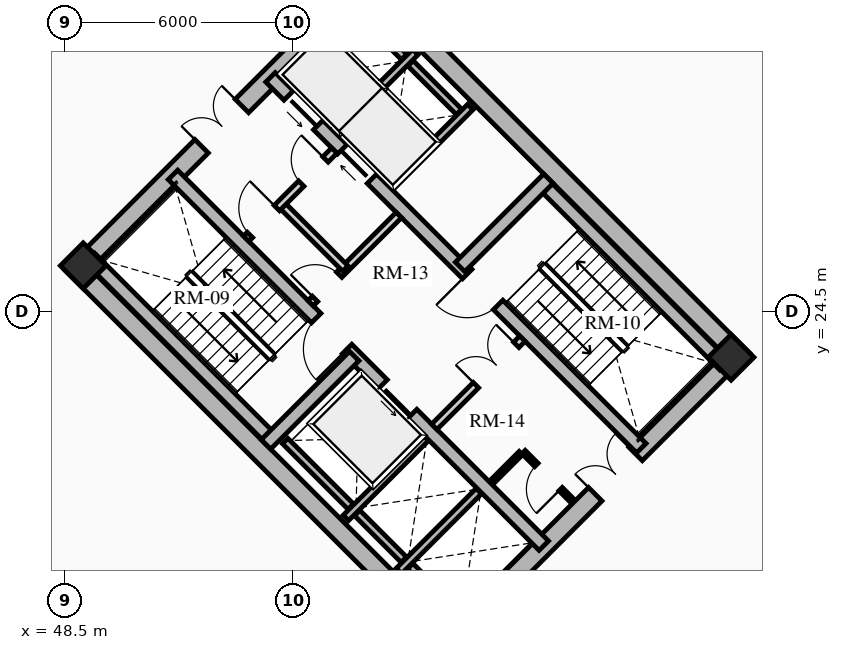
"""IFC4 building model, lengths in metres.
Left out: names, types, materials, properties, quantities, classifications, styles, units other than length and angle.
Written with IfcOpenShell. Run it as: python <this file> out.ifc"""

import sys

from ifc_helpers import new_model, si_unit, direction, frame, frame_2d, origin, origin_2d, place, context, subcontext, project, spatial, rectangle, extrude, source, transform, mapped, element, fill, save


model = new_model("IFC4")
c1 = context("Model", 3, precision=1e-05, world=origin(), true_north=direction((0.0, 1.0)))
c2 = subcontext(c1, "Body", "Model", "MODEL_VIEW")
j1 = project(units=[si_unit("LENGTHUNIT", "METRE"), si_unit("PLANEANGLEUNIT", "RADIAN")], contexts=[c1])
p1 = place(None, origin())
s1 = spatial("IfcSite", under=j1, at=p1, CompositionType="ELEMENT")
p2 = place(p1, origin())
s2 = spatial("IfcBuilding", under=s1, at=p2, CompositionType="ELEMENT")
p3 = place(p2, frame((0.0, 0.0, 13.2)))
s3 = spatial("IfcBuildingStorey", under=s2, at=p3, CompositionType="ELEMENT", Elevation=13.2)
for number, where, z_axis, x_axis in (
    (1, (58.773, 15.661, 0.0), (0.0, 0.0, 1.0), (-0.707, 0.707, 0.0)),
    (2, (66.339, 23.227, 0.0), (0.0, 0.0, 1.0), (-0.707, 0.707, 0.0)),
):
    element("IfcWall", number, at=place(p3, frame(where, z_axis=z_axis, x_axis=x_axis)), inside=s3, PredefinedType="SHEAR", context=c2, shape_type="SweptSolid", body=[
        extrude(rectangle(XDim=14.3, YDim=0.5, at=frame_2d((7.15, 0.0))), origin(), (0.0, 0.0, 1.0), 4.2),
    ])
p4 = place(p3, frame((58.596, 15.838, 0.0), z_axis=(0.0, 0.0, 1.0), x_axis=(0.707106781187, 0.707106781187, 0.0)))
e3 = element("IfcWall", 3, at=p4, inside=s3, PredefinedType="SHEAR", context=c2, shape_type="SweptSolid", body=[
    extrude(rectangle(XDim=10.7, YDim=0.5, at=frame_2d((5.35, 0.0))), origin(), (0.0, 0.0, 1.0), 4.2),
])
m1 = source(origin(), c2, "Body", "SweptSolid", [
    extrude(rectangle(XDim=1.5, YDim=2.02, at=frame_2d((0.75, 1.01))), frame((0.0, 0.26, 0.0), z_axis=(0.0, -1.0, 0.0), x_axis=(1.0, 0.0, 0.0)), (0.0, 0.0, 1.0), 0.52),
])
p5 = place(p4, frame((5.45, 0.0, 0.0)))
e4 = element("IfcOpeningElement", 4, at=p5, cuts=e3, PredefinedType="OPENING", context=c2, shape_type="MappedRepresentation", body=[
    mapped(m1, transform((0.0, 0.0, 0.0), x_axis=(1.0, 0.0, 0.0), y_axis=(0.0, 1.0, 0.0), z_axis=(0.0, 0.0, 1.0), scale=1.0)),
])
p6 = place(p3, frame((48.838, 25.596, 0.0), z_axis=(0.0, 0.0, 1.0), x_axis=(0.707106781187, 0.707106781187, 0.0)))
e5 = element("IfcWall", 5, at=p6, inside=s3, PredefinedType="SHEAR", context=c2, shape_type="SweptSolid", body=[
    extrude(rectangle(XDim=10.7, YDim=0.5, at=frame_2d((5.35, 0.0))), origin(), (0.0, 0.0, 1.0), 4.2),
])
p7 = place(p6, frame((4.6, 0.0, 0.0)))
e6 = element("IfcOpeningElement", 6, at=p7, cuts=e5, PredefinedType="OPENING", context=c2, shape_type="MappedRepresentation", body=[
    mapped(m1, transform((0.0, 0.0, 0.0), x_axis=(1.0, 0.0, 0.0), y_axis=(0.0, 1.0, 0.0), z_axis=(0.0, 0.0, 1.0), scale=1.0)),
])
p8 = place(p3, frame((61.096, 18.338, 0.0), z_axis=(0.0, 0.0, 1.0), x_axis=(-0.707106781187, 0.707106781187, 0.0)))
e7 = element("IfcWall", 7, at=p8, inside=s3, PredefinedType="SHEAR", context=c2, shape_type="SweptSolid", body=[
    extrude(rectangle(XDim=13.8, YDim=0.35, at=frame_2d((6.9, 0.0))), origin(), (0.0, 0.0, 1.0), 4.2),
])
m2 = source(origin(), c2, "Body", "SweptSolid", [
    extrude(rectangle(XDim=1.1, YDim=2.015, at=frame_2d((0.55, 1.007))), frame((0.0, 0.185, 0.0), z_axis=(0.0, -1.0, 0.0), x_axis=(1.0, 0.0, 0.0)), (0.0, 0.0, 1.0), 0.37),
])
p9 = place(p8, frame((4.9, 0.0, 0.0)))
e8 = element("IfcOpeningElement", 8, at=p9, cuts=e7, PredefinedType="OPENING", context=c2, shape_type="MappedRepresentation", body=[
    mapped(m2, transform((0.0, 0.0, 0.0), x_axis=(1.0, 0.0, 0.0), y_axis=(0.0, 1.0, 0.0), z_axis=(0.0, 0.0, 1.0), scale=1.0)),
])
m3 = source(origin(), c2, "Body", "SweptSolid", [
    extrude(rectangle(XDim=1.15, YDim=2.02, at=frame_2d((0.575, 1.01))), frame((0.0, 0.185, 0.0), z_axis=(0.0, -1.0, 0.0), x_axis=(1.0, 0.0, 0.0)), (0.0, 0.0, 1.0), 0.37),
])
p10 = place(p8, frame((7.32, 0.0, 0.0)))
e9 = element("IfcOpeningElement", 9, at=p10, cuts=e7, PredefinedType="OPENING", context=c2, shape_type="MappedRepresentation", body=[
    mapped(m3, transform((0.0, 0.0, 0.0), x_axis=(1.0, 0.0, 0.0), y_axis=(0.0, 1.0, 0.0), z_axis=(0.0, 0.0, 1.0), scale=1.0)),
])
p11 = place(p3, frame((63.662, 20.904, 0.0), z_axis=(0.0, 0.0, 1.0), x_axis=(-0.707106781187, 0.707106781187, 0.0)))
e10 = element("IfcWall", 10, at=p11, inside=s3, PredefinedType="SHEAR", context=c2, shape_type="SweptSolid", body=[
    extrude(rectangle(XDim=13.8, YDim=0.35, at=frame_2d((6.9, 0.0))), origin(), (0.0, 0.0, 1.0), 4.2),
])
p12 = place(p11, frame((10.025, 0.0, 0.0)))
e11 = element("IfcOpeningElement", 11, at=p12, cuts=e10, PredefinedType="OPENING", context=c2, shape_type="MappedRepresentation", body=[
    mapped(m2, transform((0.0, 0.0, 0.0), x_axis=(1.0, 0.0, 0.0), y_axis=(0.0, 1.0, 0.0), z_axis=(0.0, 0.0, 1.0), scale=1.0)),
])
p13 = place(p11, frame((12.025, 0.0, 0.0)))
e12 = element("IfcOpeningElement", 12, at=p13, cuts=e10, PredefinedType="OPENING", context=c2, shape_type="MappedRepresentation", body=[
    mapped(m2, transform((0.0, 0.0, 0.0), x_axis=(1.0, 0.0, 0.0), y_axis=(0.0, 1.0, 0.0), z_axis=(0.0, 0.0, 1.0), scale=1.0)),
])
p14 = place(p11, frame((5.33, 0.0, 0.0)))
e13 = element("IfcOpeningElement", 13, at=p14, cuts=e10, PredefinedType="OPENING", context=c2, shape_type="MappedRepresentation", body=[
    mapped(m3, transform((0.0, 0.0, 0.0), x_axis=(1.0, 0.0, 0.0), y_axis=(0.0, 1.0, 0.0), z_axis=(0.0, 0.0, 1.0), scale=1.0)),
])
p15 = place(p3, frame((53.922, 21.141, 0.0), z_axis=(0.0, 0.0, 1.0), x_axis=(-0.707106781187, 0.707106781187, 0.0)))
e14 = element("IfcWall", 14, at=p15, inside=s3, PredefinedType="SHEAR", context=c2, shape_type="SweptSolid", body=[
    extrude(rectangle(XDim=6.745, YDim=0.35, at=frame_2d((3.373, 0.0))), origin(), (0.0, 0.0, 1.0), 4.2),
])
p16 = place(p3, frame((53.784, 21.003, 0.0), z_axis=(0.0, 0.0, 1.0), x_axis=(0.707106781187, 0.707106781187, 0.0)))
e15 = element("IfcWall", 15, at=p16, inside=s3, PredefinedType="SHEAR", context=c2, shape_type="SweptSolid", body=[
    extrude(rectangle(XDim=3.285, YDim=0.35, at=frame_2d((1.643, 0.0))), origin(), (0.0, 0.0, 1.0), 4.2),
])
p17 = place(p3, frame((65.847, 23.089, 0.0), z_axis=(0.0, 0.0, 1.0), x_axis=(-0.707106781187, 0.707106781187, 0.0)))
e16 = element("IfcWall", 16, at=p17, inside=s3, PredefinedType="SHEAR", context=c2, shape_type="SweptSolid", body=[
    extrude(rectangle(XDim=6.745, YDim=0.35, at=frame_2d((3.373, 0.0))), origin(), (0.0, 0.0, 1.0), 4.2),
])
p18 = place(p3, frame((58.893, 25.674, 0.0), z_axis=(0.0, 0.0, 1.0), x_axis=(0.707106781187, 0.707106781187, 0.0)))
e17 = element("IfcWall", 17, at=p18, inside=s3, PredefinedType="SHEAR", context=c2, shape_type="SweptSolid", body=[
    extrude(rectangle(XDim=3.285, YDim=0.35, at=frame_2d((1.643, 0.0))), origin(), (0.0, 0.0, 1.0), 4.2),
])
for number, where, z_axis, x_axis in (
    (18, (48.976, 25.706, 0.0), (0.0, 0.0, 1.0), (0.707, 0.707, 0.0)),
    (19, (66.024, 23.294, 0.0), (0.0, 0.0, 1.0), (0.707, 0.707, 0.0)),
):
    element("IfcColumn", number, at=place(p3, frame(where, z_axis=z_axis, x_axis=x_axis)), inside=s3, PredefinedType="COLUMN", context=c2, shape_type="SweptSolid", body=[
        extrude(rectangle(XDim=0.85, YDim=0.85, at=origin_2d()), origin(), (0.0, 0.0, 1.0), 4.2),
    ])
p19 = place(p3, frame((55.888, 19.069, 0.0), z_axis=(0.0, 0.0, 1.0), x_axis=(0.707106781187, 0.707106781187, 0.0)))
e20 = element("IfcWall", 20, at=p19, inside=s3, PredefinedType="SHEAR", context=c2, shape_type="SweptSolid", body=[
    extrude(rectangle(XDim=2.97, YDim=0.2, at=frame_2d((1.485, 0.0))), origin(), (0.0, 0.0, 1.0), 4.2),
])
p20 = place(p3, frame((56.015, 19.366, 0.0), z_axis=(0.0, 0.0, 1.0), x_axis=(-0.707106781187, 0.707106781187, 0.0)))
e21 = element("IfcWall", 21, at=p20, inside=s3, PredefinedType="SHEAR", context=c2, shape_type="SweptSolid", body=[
    extrude(rectangle(XDim=2.44, YDim=0.2, at=frame_2d((1.22, 0.0))), origin(), (0.0, 0.0, 1.0), 4.2),
])
p21 = place(p3, frame((57.284, 17.673, 0.0), z_axis=(0.0, 0.0, 1.0), x_axis=(0.707147878904, 0.70706568108, 0.0)))
e22 = element("IfcWall", 22, at=p21, inside=s3, PredefinedType="SHEAR", context=c2, shape_type="SweptSolid", body=[
    extrude(rectangle(XDim=2.97, YDim=0.2, at=frame_2d((1.485, 0.0))), origin(), (0.0, 0.0, 1.0), 4.2),
])
p22 = place(p3, frame((57.412, 17.97, 0.0), z_axis=(0.0, 0.0, 1.0), x_axis=(-0.707106781187, 0.707106781187, 0.0)))
e23 = element("IfcWall", 23, at=p22, inside=s3, PredefinedType="SHEAR", context=c2, shape_type="SweptSolid", body=[
    extrude(rectangle(XDim=1.735, YDim=0.2, at=frame_2d((0.867, 0.0))), origin(), (0.0, 0.0, 1.0), 4.2),
])
p23 = place(p3, frame((58.737, 16.644, 0.0), z_axis=(0.0, 0.0, 1.0), x_axis=(-0.707032117043, 0.707181437447, 0.0)))
e24 = element("IfcWall", 24, at=p23, inside=s3, PredefinedType="SHEAR", context=c2, shape_type="SweptSolid", body=[
    extrude(rectangle(XDim=1.635, YDim=0.2, at=frame_2d((0.817, 0.0))), origin(), (0.0, 0.0, 1.0), 4.2),
])
p24 = place(p3, frame((57.062, 27.781, 0.0), z_axis=(0.0, 0.0, 1.0), x_axis=(0.707106781187, 0.707106781187, 0.0)))
e25 = element("IfcWall", 25, at=p24, inside=s3, PredefinedType="SHEAR", context=c2, shape_type="SweptSolid", body=[
    extrude(rectangle(XDim=2.97, YDim=0.2, at=frame_2d((1.485, 0.0))), origin(), (0.0, 0.0, 1.0), 4.2),
])
p25 = place(p3, frame((55.615, 29.227, 0.0), z_axis=(0.0, 0.0, 1.0), x_axis=(0.707147878904, 0.70706568108, 0.0)))
e26 = element("IfcWall", 26, at=p25, inside=s3, PredefinedType="SHEAR", context=c2, shape_type="SweptSolid", body=[
    extrude(rectangle(XDim=2.97, YDim=0.2, at=frame_2d((1.485, 0.0))), origin(), (0.0, 0.0, 1.0), 4.2),
])
p26 = place(p3, frame((58.865, 29.754, 0.0), z_axis=(0.0, 0.0, 1.0), x_axis=(-0.707174411312, 0.707039144592, 0.0)))
e27 = element("IfcWall", 27, at=p26, inside=s3, PredefinedType="SHEAR", context=c2, shape_type="SweptSolid", body=[
    extrude(rectangle(XDim=1.805, YDim=0.2, at=frame_2d((0.902, 0.0))), origin(), (0.0, 0.0, 1.0), 4.2),
])
p27 = place(p3, frame((57.419, 31.2, 0.0), z_axis=(0.0, 0.0, 1.0), x_axis=(-0.707032117043, 0.707181437447, 0.0)))
e28 = element("IfcWall", 28, at=p27, inside=s3, PredefinedType="SHEAR", context=c2, shape_type="SweptSolid", body=[
    extrude(rectangle(XDim=1.635, YDim=0.2, at=frame_2d((0.817, 0.0))), origin(), (0.0, 0.0, 1.0), 4.2),
])
p28 = place(p3, frame((58.214, 21.467, 0.0), z_axis=(0.0, 0.0, 1.0), x_axis=(0.707106781187, 0.707106781187, 0.0)))
e29 = element("IfcWall", 29, at=p28, inside=s3, PredefinedType="PARTITIONING", context=c2, shape_type="SweptSolid", body=[
    extrude(rectangle(XDim=3.28, YDim=0.2, at=frame_2d((1.64, 0.0))), origin(), (0.0, 0.0, 1.0), 3.8),
])
m4 = source(origin(), c2, "Body", "SweptSolid", [
    extrude(rectangle(XDim=1.5, YDim=2.02, at=frame_2d((0.75, 1.01))), frame((0.0, 0.11, 0.0), z_axis=(0.0, -1.0, 0.0), x_axis=(1.0, 0.0, 0.0)), (0.0, 0.0, 1.0), 0.22),
])
p29 = place(p28, frame((1.55, 0.0, 0.0)))
e30 = element("IfcOpeningElement", 30, at=p29, cuts=e29, PredefinedType="OPENING", context=c2, shape_type="MappedRepresentation", body=[
    mapped(m4, transform((0.0, 0.0, 0.0), x_axis=(1.0, 0.0, 0.0), y_axis=(0.0, 1.0, 0.0), z_axis=(0.0, 0.0, 1.0), scale=1.0)),
])
p30 = place(p3, frame((54.961, 24.719, 0.0), z_axis=(0.0, 0.0, 1.0), x_axis=(0.707106781187, 0.707106781187, 0.0)))
e31 = element("IfcWall", 31, at=p30, inside=s3, PredefinedType="PARTITIONING", context=c2, shape_type="SweptSolid", body=[
    extrude(rectangle(XDim=3.28, YDim=0.2, at=frame_2d((1.64, 0.0))), origin(), (0.0, 0.0, 1.0), 3.8),
])
m5 = source(origin(), c2, "Body", "SweptSolid", [
    extrude(rectangle(XDim=0.9, YDim=2.005, at=frame_2d((0.45, 1.002))), frame((0.0, 0.11, 0.0), z_axis=(0.0, -1.0, 0.0), x_axis=(1.0, 0.0, 0.0)), (0.0, 0.0, 1.0), 0.22),
])
p31 = place(p30, frame((0.16, 0.0, 0.0)))
e32 = element("IfcOpeningElement", 32, at=p31, cuts=e31, PredefinedType="OPENING", context=c2, shape_type="MappedRepresentation", body=[
    mapped(m5, transform((0.0, 0.0, 0.0), x_axis=(1.0, 0.0, 0.0), y_axis=(0.0, 1.0, 0.0), z_axis=(0.0, 0.0, 1.0), scale=1.0)),
])
p32 = place(p3, frame((55.874, 25.631, 0.0), z_axis=(0.0, 0.0, 1.0), x_axis=(-0.707157639372, 0.707055919343, 0.0)))
e33 = element("IfcWall", 33, at=p32, inside=s3, PredefinedType="PARTITIONING", context=c2, shape_type="SweptSolid", body=[
    extrude(rectangle(XDim=2.4, YDim=0.2, at=frame_2d((1.2, 0.0))), origin(), (0.0, 0.0, 1.0), 3.8),
])
p33 = place(p3, frame((53.264, 26.416, 0.0), z_axis=(0.0, 0.0, 1.0), x_axis=(0.707106781187, 0.707106781187, 0.0)))
e34 = element("IfcWall", 34, at=p33, inside=s3, PredefinedType="PARTITIONING", context=c2, shape_type="SweptSolid", body=[
    extrude(rectangle(XDim=3.28, YDim=0.2, at=frame_2d((1.64, 0.0))), origin(), (0.0, 0.0, 1.0), 3.8),
])
m6 = source(origin(), c2, "Body", "SweptSolid", [
    extrude(rectangle(XDim=1.0, YDim=2.015, at=frame_2d((0.5, 1.007))), frame((0.0, 0.11, 0.0), z_axis=(0.0, -1.0, 0.0), x_axis=(1.0, 0.0, 0.0)), (0.0, 0.0, 1.0), 0.22),
])
p34 = place(p33, frame((0.14, 0.0, 0.0)))
e35 = element("IfcOpeningElement", 35, at=p34, cuts=e34, PredefinedType="OPENING", context=c2, shape_type="MappedRepresentation", body=[
    mapped(m6, transform((0.0, 0.0, 0.0), x_axis=(1.0, 0.0, 0.0), y_axis=(0.0, 1.0, 0.0), z_axis=(0.0, 0.0, 1.0), scale=1.0)),
])
p35 = place(p33, frame((2.05, 0.0, 0.0)))
e36 = element("IfcOpeningElement", 36, at=p35, cuts=e34, PredefinedType="OPENING", context=c2, shape_type="MappedRepresentation", body=[
    mapped(m5, transform((0.0, 0.0, 0.0), x_axis=(1.0, 0.0, 0.0), y_axis=(0.0, 1.0, 0.0), z_axis=(0.0, 0.0, 1.0), scale=1.0)),
])
p36 = place(p3, frame((61.835, 19.529, 0.0), z_axis=(0.0, 0.0, 1.0), x_axis=(-0.707174592913, 0.707038962956, 0.0)))
e37 = element("IfcWall", 37, at=p36, inside=s3, PredefinedType="PARTITIONING", context=c2, shape_type="SweptSolid", body=[
    extrude(rectangle(XDim=1.8, YDim=0.125, at=frame_2d((0.9, 0.0))), origin(), (0.0, 0.0, 1.0), 3.8),
])
m7 = source(origin(), c2, "Body", "SweptSolid", [
    extrude(rectangle(XDim=0.9, YDim=2.005, at=frame_2d((0.45, 1.002))), frame((0.0, 0.073, 0.0), z_axis=(0.0, -1.0, 0.0), x_axis=(1.0, 0.0, 0.0)), (0.0, 0.0, 1.0), 0.145),
])
p37 = place(p36, frame((0.42, 0.0, 0.0)))
e38 = element("IfcOpeningElement", 38, at=p37, cuts=e37, PredefinedType="OPENING", context=c2, shape_type="MappedRepresentation", body=[
    mapped(m7, transform((0.0, 0.0, 0.0), x_axis=(1.0, 0.0, 0.0), y_axis=(0.0, 1.0, 0.0), z_axis=(0.0, 0.0, 1.0), scale=1.0)),
])
p38 = place(p3, frame((59.713, 19.996, 0.0), z_axis=(0.0, 0.0, 1.0), x_axis=(0.707217726, 0.706995818963, 0.0)))
e39 = element("IfcWall", 39, at=p38, inside=s3, PredefinedType="PARTITIONING", context=c2, shape_type="SweptSolid", body=[
    extrude(rectangle(XDim=1.1, YDim=0.125, at=frame_2d((0.55, 0.0))), origin(), (0.0, 0.0, 1.0), 3.8),
])
m8 = source(origin(), c2, "Body", "SweptSolid", [
    extrude(rectangle(XDim=1.1, YDim=2.015, at=frame_2d((0.55, 1.007))), frame((0.0, 0.025, 0.0), z_axis=(0.0, -1.0, 0.0), x_axis=(1.0, 0.0, 0.0)), (0.0, 0.0, 1.0), 0.05),
])
p39 = place(p9, origin())
e40 = element("IfcDoor", 40, at=p39, inside=s3, OperationType="SLIDING_TO_LEFT", PredefinedType="DOOR", context=c2, shape_type="MappedRepresentation", body=[
    mapped(m8, transform((0.0, 0.0, 0.0), x_axis=(1.0, 0.0, 0.0), y_axis=(0.0, 1.0, 0.0), z_axis=(0.0, 0.0, 1.0), scale=1.0)),
])
fill(e8, e40)
p40 = place(p12, origin())
e41 = element("IfcDoor", 41, at=p40, inside=s3, OperationType="SLIDING_TO_RIGHT", PredefinedType="DOOR", context=c2, shape_type="MappedRepresentation", body=[
    mapped(m8, transform((0.0, 0.0, 0.0), x_axis=(1.0, 0.0, 0.0), y_axis=(0.0, 1.0, 0.0), z_axis=(0.0, 0.0, 1.0), scale=1.0)),
])
fill(e11, e41)
p41 = place(p13, origin())
e42 = element("IfcDoor", 42, at=p41, inside=s3, OperationType="SLIDING_TO_LEFT", PredefinedType="DOOR", context=c2, shape_type="MappedRepresentation", body=[
    mapped(m8, transform((0.0, 0.0, 0.0), x_axis=(1.0, 0.0, 0.0), y_axis=(0.0, 1.0, 0.0), z_axis=(0.0, 0.0, 1.0), scale=1.0)),
])
fill(e12, e42)
m9 = source(origin(), c2, "Body", "SweptSolid", [
    extrude(rectangle(XDim=1.15, YDim=2.02, at=frame_2d((0.575, 1.01))), frame((0.0, 0.025, 0.0), z_axis=(0.0, -1.0, 0.0), x_axis=(1.0, 0.0, 0.0)), (0.0, 0.0, 1.0), 0.05),
])
p42 = place(p10, origin())
e43 = element("IfcDoor", 43, at=p42, inside=s3, OperationType="SINGLE_SWING_LEFT", PredefinedType="DOOR", context=c2, shape_type="MappedRepresentation", body=[
    mapped(m9, transform((0.0, 0.0, 0.0), x_axis=(1.0, 0.0, 0.0), y_axis=(0.0, 1.0, 0.0), z_axis=(0.0, 0.0, 1.0), scale=1.0)),
])
fill(e9, e43)
p43 = place(p14, origin())
e44 = element("IfcDoor", 44, at=p43, inside=s3, OperationType="SINGLE_SWING_RIGHT", PredefinedType="DOOR", context=c2, shape_type="MappedRepresentation", body=[
    mapped(m9, transform((0.0, 0.0, 0.0), x_axis=(1.0, 0.0, 0.0), y_axis=(0.0, 1.0, 0.0), z_axis=(0.0, 0.0, 1.0), scale=1.0)),
])
fill(e13, e44)
m10 = source(origin(), c2, "Body", "SweptSolid", [
    extrude(rectangle(XDim=1.5, YDim=2.02, at=frame_2d((0.75, 1.01))), frame((0.0, 0.025, 0.0), z_axis=(0.0, -1.0, 0.0), x_axis=(1.0, 0.0, 0.0)), (0.0, 0.0, 1.0), 0.05),
])
p44 = place(p7, origin())
e45 = element("IfcDoor", 45, at=p44, inside=s3, OperationType="DOUBLE_DOOR_SINGLE_SWING", PredefinedType="DOOR", context=c2, shape_type="MappedRepresentation", body=[
    mapped(m10, transform((0.0, 0.0, 0.0), x_axis=(1.0, 0.0, 0.0), y_axis=(0.0, 1.0, 0.0), z_axis=(0.0, 0.0, 1.0), scale=1.0)),
])
fill(e6, e45)
p45 = place(p5, origin())
e46 = element("IfcDoor", 46, at=p45, inside=s3, OperationType="DOUBLE_DOOR_SINGLE_SWING", PredefinedType="DOOR", context=c2, shape_type="MappedRepresentation", body=[
    mapped(m10, transform((0.0, 0.0, 0.0), x_axis=(1.0, 0.0, 0.0), y_axis=(0.0, 1.0, 0.0), z_axis=(0.0, 0.0, 1.0), scale=1.0)),
])
fill(e4, e46)
p46 = place(p29, origin())
e47 = element("IfcDoor", 47, at=p46, inside=s3, OperationType="DOUBLE_DOOR_SINGLE_SWING", PredefinedType="DOOR", context=c2, shape_type="MappedRepresentation", body=[
    mapped(m10, transform((0.0, 0.0, 0.0), x_axis=(1.0, 0.0, 0.0), y_axis=(0.0, 1.0, 0.0), z_axis=(0.0, 0.0, 1.0), scale=1.0)),
])
fill(e30, e47)
m11 = source(origin(), c2, "Body", "SweptSolid", [
    extrude(rectangle(XDim=0.9, YDim=2.005, at=frame_2d((0.45, 1.002))), frame((0.0, 0.025, 0.0), z_axis=(0.0, -1.0, 0.0), x_axis=(1.0, 0.0, 0.0)), (0.0, 0.0, 1.0), 0.05),
])
p47 = place(p31, origin())
e48 = element("IfcDoor", 48, at=p47, inside=s3, OperationType="SINGLE_SWING_LEFT", PredefinedType="DOOR", context=c2, shape_type="MappedRepresentation", body=[
    mapped(m11, transform((0.0, 0.0, 0.0), x_axis=(1.0, 0.0, 0.0), y_axis=(0.0, 1.0, 0.0), z_axis=(0.0, 0.0, 1.0), scale=1.0)),
])
fill(e32, e48)
m12 = source(origin(), c2, "Body", "SweptSolid", [
    extrude(rectangle(XDim=1.0, YDim=2.015, at=frame_2d((0.5, 1.007))), frame((0.0, 0.025, 0.0), z_axis=(0.0, -1.0, 0.0), x_axis=(1.0, 0.0, 0.0)), (0.0, 0.0, 1.0), 0.05),
])
p48 = place(p34, origin())
e49 = element("IfcDoor", 49, at=p48, inside=s3, OperationType="SINGLE_SWING_RIGHT", PredefinedType="DOOR", context=c2, shape_type="MappedRepresentation", body=[
    mapped(m12, transform((0.0, 0.0, 0.0), x_axis=(1.0, 0.0, 0.0), y_axis=(0.0, 1.0, 0.0), z_axis=(0.0, 0.0, 1.0), scale=1.0)),
])
fill(e35, e49)
p49 = place(p37, origin())
e50 = element("IfcDoor", 50, at=p49, inside=s3, OperationType="SINGLE_SWING_LEFT", PredefinedType="DOOR", context=c2, shape_type="MappedRepresentation", body=[
    mapped(m11, transform((0.0, 0.0, 0.0), x_axis=(1.0, 0.0, 0.0), y_axis=(0.0, 1.0, 0.0), z_axis=(0.0, 0.0, 1.0), scale=1.0)),
])
fill(e38, e50)
p50 = place(p35, origin())
e51 = element("IfcDoor", 51, at=p50, inside=s3, OperationType="SINGLE_SWING_RIGHT", PredefinedType="DOOR", context=c2, shape_type="MappedRepresentation", body=[
    mapped(m11, transform((0.0, 0.0, 0.0), x_axis=(1.0, 0.0, 0.0), y_axis=(0.0, 1.0, 0.0), z_axis=(0.0, 0.0, 1.0), scale=1.0)),
])
fill(e36, e51)
save(model, sys.argv[1])
